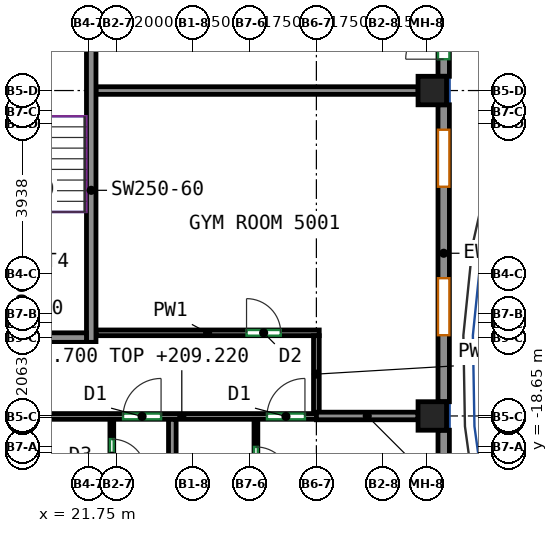
"""IFC4 building model, lengths in metres.
Left out: names, types, materials, properties, quantities, classifications, styles, units other than length and angle.
Written with IfcOpenShell. Run it as: python <this file> out.ifc"""

import sys

from ifc_helpers import new_model, si_unit, direction, frame, frame_2d, origin, origin_2d, place, context, subcontext, project, spatial, rectangle, extrude, source, transform, mapped, element, fill, save


model = new_model("IFC4")
c1 = context("Model", 3, precision=1e-05, world=origin(), true_north=direction((0.0, 1.0)))
c2 = subcontext(c1, "Body", "Model", "MODEL_VIEW")
j1 = project(units=[si_unit("LENGTHUNIT", "METRE"), si_unit("PLANEANGLEUNIT", "RADIAN")], contexts=[c1])
p1 = place(None, origin())
s1 = spatial("IfcSite", under=j1, at=p1, CompositionType="ELEMENT")
p2 = place(p1, origin())
s2 = spatial("IfcBuilding", under=s1, at=p2, CompositionType="ELEMENT")
p3 = place(p2, frame((0.0, 0.0, 206.7)))
s3 = spatial("IfcBuildingStorey", under=s2, at=p3, CompositionType="ELEMENT", Elevation=206.7)
m1 = source(origin(), c2, "Body", "SweptSolid", [
    extrude(rectangle(XDim=0.75, YDim=0.75, at=origin_2d()), origin(), (0.0, 0.0, 1.0), 3.12),
])
for number, where, z_axis, x_axis in (
    (1, (30.8, -17.688, 0.0), (0.0, 0.0, 1.0), (1.0, 0.0, 0.0)),
    (2, (30.8, -9.125, 0.0), (0.0, 0.0, 1.0), (1.0, 0.0, 0.0)),
):
    element("IfcColumn", number, at=place(p3, frame(where, z_axis=z_axis, x_axis=x_axis)), inside=s3, PredefinedType="COLUMN", context=c2, shape_type="MappedRepresentation", body=[
        mapped(m1, transform((0.0, 0.0, 0.0))),
    ])
m2 = source(origin(), c2, "Body", "SweptSolid", [
    extrude(rectangle(XDim=8.0, YDim=0.25, at=frame_2d((4.0, 0.0))), origin(), (0.0, 0.0, 1.0), 3.12),
])
p4 = place(p3, frame((21.825, -15.75, 0.0), z_axis=(0.0, 0.0, 1.0), x_axis=(0.0, 1.0, 0.0)))
e3 = element("IfcWall", 3, at=p4, inside=s3, PredefinedType="SHEAR", context=c2, shape_type="MappedRepresentation", body=[
    mapped(m2, transform((0.0, 0.0, 0.0))),
])
m3 = source(origin(), c2, "Body", "SweptSolid", [
    extrude(rectangle(XDim=3.7, YDim=0.25, at=frame_2d((1.85, 0.0))), origin(), (0.0, 0.0, 1.0), 3.12),
])
p5 = place(p3, frame((18.0, -15.625, 0.0), z_axis=(0.0, 0.0, 1.0), x_axis=(1.0, 0.0, 0.0)))
e4 = element("IfcWall", 4, at=p5, inside=s3, PredefinedType="SHEAR", context=c2, shape_type="MappedRepresentation", body=[
    mapped(m3, transform((0.0, 0.0, 0.0))),
])
m4 = source(origin(), c2, "Body", "SweptSolid", [
    extrude(rectangle(XDim=3.994, YDim=0.3, at=frame_2d((1.997, 0.0))), origin(), (0.0, 0.0, 1.0), 3.12),
])
p6 = place(p3, frame((31.1, -22.057, 0.0), z_axis=(0.0, 0.0, 1.0), x_axis=(0.0, 1.0, 0.0)))
e5 = element("IfcWall", 5, at=p6, inside=s3, PredefinedType="SOLIDWALL", context=c2, shape_type="MappedRepresentation", body=[
    mapped(m4, transform((0.0, 0.0, 0.0))),
])
p7 = place(p6, frame((1.75, 0.0, 0.85)))
e6 = element("IfcOpeningElement", 6, at=p7, cuts=e5, PredefinedType="OPENING", context=c2, shape_type="SweptSolid", body=[
    extrude(rectangle(XDim=1.5, YDim=1.95, at=frame_2d((0.75, 0.975))), frame((0.0, 0.16, 0.0), z_axis=(0.0, -1.0, 0.0), x_axis=(1.0, 0.0, 0.0)), (0.0, 0.0, 1.0), 0.32),
])
m5 = source(origin(), c2, "Body", "SweptSolid", [
    extrude(rectangle(XDim=7.812, YDim=0.3, at=frame_2d((3.906, 0.0))), origin(), (0.0, 0.0, 1.0), 3.12),
])
p8 = place(p3, frame((31.1, -17.312, 0.0), z_axis=(0.0, 0.0, 1.0), x_axis=(0.0, 1.0, 0.0)))
e7 = element("IfcWall", 7, at=p8, inside=s3, PredefinedType="SOLIDWALL", context=c2, shape_type="MappedRepresentation", body=[
    mapped(m5, transform((0.0, 0.0, 0.0))),
])
p9 = place(p8, frame((1.75, 0.0, 0.85)))
e8 = element("IfcOpeningElement", 8, at=p9, cuts=e7, PredefinedType="OPENING", context=c2, shape_type="SweptSolid", body=[
    extrude(rectangle(XDim=1.5, YDim=1.95, at=frame_2d((0.75, 0.975))), frame((0.0, 0.16, 0.0), z_axis=(0.0, -1.0, 0.0), x_axis=(1.0, 0.0, 0.0)), (0.0, 0.0, 1.0), 0.32),
])
p10 = place(p8, frame((5.656, 0.0, 0.85)))
e9 = element("IfcOpeningElement", 9, at=p10, cuts=e7, PredefinedType="OPENING", context=c2, shape_type="SweptSolid", body=[
    extrude(rectangle(XDim=1.5, YDim=1.95, at=frame_2d((0.75, 0.975))), frame((0.0, 0.16, 0.0), z_axis=(0.0, -1.0, 0.0), x_axis=(1.0, 0.0, 0.0)), (0.0, 0.0, 1.0), 0.32),
])
p11 = place(p3, frame((31.1, -8.75, 0.0), z_axis=(0.0, 0.0, 1.0), x_axis=(0.0, 1.0, 0.0)))
e10 = element("IfcWall", 10, at=p11, inside=s3, PredefinedType="SOLIDWALL", context=c2, shape_type="MappedRepresentation", body=[
    mapped(m5, transform((0.0, 0.0, 0.0))),
])
p12 = place(p11, frame((1.75, 0.0, 0.85)))
e11 = element("IfcOpeningElement", 11, at=p12, cuts=e10, PredefinedType="OPENING", context=c2, shape_type="SweptSolid", body=[
    extrude(rectangle(XDim=1.5, YDim=1.95, at=frame_2d((0.75, 0.975))), frame((0.0, 0.16, 0.0), z_axis=(0.0, -1.0, 0.0), x_axis=(1.0, 0.0, 0.0)), (0.0, 0.0, 1.0), 0.32),
])
p13 = place(p11, frame((0.45, 0.0, 0.0)))
e12 = element("IfcOpeningElement", 12, at=p13, cuts=e10, PredefinedType="OPENING", context=c2, shape_type="SweptSolid", body=[
    extrude(rectangle(XDim=1.0, YDim=2.1, at=frame_2d((0.5, 1.05))), frame((0.0, 0.16, 0.0), z_axis=(0.0, -1.0, 0.0), x_axis=(1.0, 0.0, 0.0)), (0.0, 0.0, 1.0), 0.32),
])
p14 = place(p11, frame((5.656, 0.0, 0.85)))
e13 = element("IfcOpeningElement", 13, at=p14, cuts=e10, PredefinedType="OPENING", context=c2, shape_type="SweptSolid", body=[
    extrude(rectangle(XDim=1.5, YDim=1.95, at=frame_2d((0.75, 0.975))), frame((0.0, 0.16, 0.0), z_axis=(0.0, -1.0, 0.0), x_axis=(1.0, 0.0, 0.0)), (0.0, 0.0, 1.0), 0.32),
])
p15 = place(p11, frame((4.356, 0.0, 0.0)))
e14 = element("IfcOpeningElement", 14, at=p15, cuts=e10, PredefinedType="OPENING", context=c2, shape_type="SweptSolid", body=[
    extrude(rectangle(XDim=1.0, YDim=2.1, at=frame_2d((0.5, 1.05))), frame((0.0, 0.16, 0.0), z_axis=(0.0, -1.0, 0.0), x_axis=(1.0, 0.0, 0.0)), (0.0, 0.0, 1.0), 0.32),
])
p16 = place(p3, frame((20.667, -17.7, 0.0), z_axis=(0.0, 0.0, 1.0), x_axis=(1.0, 0.0, 0.0)))
e15 = element("IfcWall", 15, at=p16, inside=s3, PredefinedType="PARTITIONING", context=c2, shape_type="SweptSolid", body=[
    extrude(rectangle(XDim=7.083, YDim=0.15, at=frame_2d((3.542, 0.0))), origin(), (0.0, 0.0, 1.0), 2.52),
])
p17 = place(p16, frame((1.996, 0.0, 0.0)))
e16 = element("IfcOpeningElement", 16, at=p17, cuts=e15, PredefinedType="OPENING", context=c2, shape_type="SweptSolid", body=[
    extrude(rectangle(XDim=1.0, YDim=2.1, at=frame_2d((0.5, 1.05))), frame((0.0, 0.085, 0.0), z_axis=(0.0, -1.0, 0.0), x_axis=(1.0, 0.0, 0.0)), (0.0, 0.0, 1.0), 0.17),
])
p18 = place(p16, frame((5.782, 0.0, 0.0)))
e17 = element("IfcOpeningElement", 17, at=p18, cuts=e15, PredefinedType="OPENING", context=c2, shape_type="SweptSolid", body=[
    extrude(rectangle(XDim=1.0, YDim=2.1, at=frame_2d((0.5, 1.05))), frame((0.0, 0.085, 0.0), z_axis=(0.0, -1.0, 0.0), x_axis=(1.0, 0.0, 0.0)), (0.0, 0.0, 1.0), 0.17),
])
p19 = place(p3, frame((21.95, -15.5, 0.0), z_axis=(0.0, 0.0, 1.0), x_axis=(1.0, 0.0, 0.0)))
e18 = element("IfcWall", 18, at=p19, inside=s3, PredefinedType="PARTITIONING", context=c2, shape_type="SweptSolid", body=[
    extrude(rectangle(XDim=5.875, YDim=0.15, at=frame_2d((2.938, 0.0))), origin(), (0.0, 0.0, 1.0), 3.12),
])
p20 = place(p19, frame((3.962, 0.0, 0.0)))
e19 = element("IfcOpeningElement", 19, at=p20, cuts=e18, PredefinedType="OPENING", context=c2, shape_type="SweptSolid", body=[
    extrude(rectangle(XDim=0.9, YDim=2.1, at=frame_2d((0.45, 1.05))), frame((0.0, 0.085, 0.0), z_axis=(0.0, -1.0, 0.0), x_axis=(1.0, 0.0, 0.0)), (0.0, 0.0, 1.0), 0.17),
])
p21 = place(p3, frame((27.75, -17.598, 0.0), z_axis=(0.0, 0.0, 1.0), x_axis=(0.0, 1.0, 0.0)))
e20 = element("IfcWall", 20, at=p21, inside=s3, PredefinedType="PARTITIONING", context=c2, shape_type="SweptSolid", body=[
    extrude(rectangle(XDim=2.023, YDim=0.15, at=frame_2d((1.011, 0.0))), origin(), (0.0, 0.0, 1.0), 2.52),
])
p22 = place(p3, frame((22.367, -17.777, 0.0), z_axis=(0.0, 0.0, 1.0), x_axis=(0.0, -1.0, 0.0)))
e21 = element("IfcWall", 21, at=p22, inside=s3, PredefinedType="PARTITIONING", context=c2, shape_type="SweptSolid", body=[
    extrude(rectangle(XDim=2.575, YDim=0.1, at=frame_2d((1.288, 0.0))), origin(), (0.0, 0.0, 1.0), 3.12),
])
p23 = place(p22, frame((0.519, 0.0, 0.0)))
e22 = element("IfcOpeningElement", 22, at=p23, cuts=e21, PredefinedType="OPENING", context=c2, shape_type="SweptSolid", body=[
    extrude(rectangle(XDim=0.9, YDim=2.1, at=frame_2d((0.45, 1.05))), frame((0.0, 0.06, 0.0), z_axis=(0.0, -1.0, 0.0), x_axis=(1.0, 0.0, 0.0)), (0.0, 0.0, 1.0), 0.12),
])
p24 = place(p3, frame((23.959, -20.348, 0.0), z_axis=(0.0, 0.0, 1.0), x_axis=(0.0, 1.0, 0.0)))
e23 = element("IfcWall", 23, at=p24, inside=s3, PredefinedType="PARTITIONING", context=c2, shape_type="SweptSolid", body=[
    extrude(rectangle(XDim=2.571, YDim=0.2, at=frame_2d((1.285, 0.0))), origin(), (0.0, 0.0, 1.0), 3.12),
])
p25 = place(p3, frame((26.159, -17.777, 0.0), z_axis=(0.0, 0.0, 1.0), x_axis=(0.0, -1.0, 0.0)))
e24 = element("IfcWall", 24, at=p25, inside=s3, PredefinedType="PARTITIONING", context=c2, shape_type="SweptSolid", body=[
    extrude(rectangle(XDim=2.561, YDim=0.1, at=frame_2d((1.28, 0.0))), origin(), (0.0, 0.0, 1.0), 3.12),
])
p26 = place(p25, frame((0.725, 0.0, 0.0)))
e25 = element("IfcOpeningElement", 25, at=p26, cuts=e24, PredefinedType="OPENING", context=c2, shape_type="SweptSolid", body=[
    extrude(rectangle(XDim=0.9, YDim=2.1, at=frame_2d((0.45, 1.05))), frame((0.0, 0.06, 0.0), z_axis=(0.0, -1.0, 0.0), x_axis=(1.0, 0.0, 0.0)), (0.0, 0.0, 1.0), 0.12),
])
p27 = place(p3, frame((27.752, -17.688, 0.0), z_axis=(0.0, 0.0, 1.0), x_axis=(1.0, 0.0, 0.0)))
e26 = element("IfcWall", 26, at=p27, inside=s3, PredefinedType="PARTITIONING", context=c2, shape_type="SweptSolid", body=[
    extrude(rectangle(XDim=2.673, YDim=0.2, at=frame_2d((1.336, 0.0))), origin(), (0.0, 0.0, 1.0), 2.52),
])
p28 = place(p3, frame((21.95, -9.125, 0.0), z_axis=(0.0, 0.0, 1.0), x_axis=(1.0, 0.0, 0.0)))
e27 = element("IfcWall", 27, at=p28, inside=s3, PredefinedType="PARTITIONING", context=c2, shape_type="SweptSolid", body=[
    extrude(rectangle(XDim=8.475, YDim=0.2, at=frame_2d((4.238, 0.0))), origin(), (0.0, 0.0, 1.0), 3.12),
])
p29 = place(p9, origin())
e28 = element("IfcWindow", 28, at=p29, inside=s3, PartitioningType="SINGLE_PANEL", PredefinedType="WINDOW", context=c2, shape_type="SweptSolid", body=[
    extrude(rectangle(XDim=1.5, YDim=1.95, at=frame_2d((0.75, 0.975))), frame((0.0, 0.03, 0.0), z_axis=(0.0, -1.0, 0.0), x_axis=(1.0, 0.0, 0.0)), (0.0, 0.0, 1.0), 0.06),
])
fill(e8, e28)
p30 = place(p10, origin())
e29 = element("IfcWindow", 29, at=p30, inside=s3, PartitioningType="SINGLE_PANEL", PredefinedType="WINDOW", context=c2, shape_type="SweptSolid", body=[
    extrude(rectangle(XDim=1.5, YDim=1.95, at=frame_2d((0.75, 0.975))), frame((0.0, 0.03, 0.0), z_axis=(0.0, -1.0, 0.0), x_axis=(1.0, 0.0, 0.0)), (0.0, 0.0, 1.0), 0.06),
])
fill(e9, e29)
p31 = place(p13, origin())
e30 = element("IfcDoor", 30, at=p31, inside=s3, OperationType="SINGLE_SWING_LEFT", PredefinedType="DOOR", context=c2, shape_type="SweptSolid", body=[
    extrude(rectangle(XDim=1.0, YDim=2.1, at=frame_2d((0.5, 1.05))), frame((0.0, 0.025, 0.0), z_axis=(0.0, -1.0, 0.0), x_axis=(1.0, 0.0, 0.0)), (0.0, 0.0, 1.0), 0.05),
])
fill(e12, e30)
p32 = place(p26, origin())
e31 = element("IfcDoor", 31, at=p32, inside=s3, OperationType="SINGLE_SWING_RIGHT", PredefinedType="DOOR", context=c2, shape_type="SweptSolid", body=[
    extrude(rectangle(XDim=0.9, YDim=2.1, at=frame_2d((0.45, 1.05))), frame((0.0, 0.025, 0.0), z_axis=(0.0, -1.0, 0.0), x_axis=(1.0, 0.0, 0.0)), (0.0, 0.0, 1.0), 0.05),
])
fill(e25, e31)
p33 = place(p23, origin())
e32 = element("IfcDoor", 32, at=p33, inside=s3, OperationType="SINGLE_SWING_RIGHT", PredefinedType="DOOR", context=c2, shape_type="SweptSolid", body=[
    extrude(rectangle(XDim=0.9, YDim=2.1, at=frame_2d((0.45, 1.05))), frame((0.0, 0.025, 0.0), z_axis=(0.0, -1.0, 0.0), x_axis=(1.0, 0.0, 0.0)), (0.0, 0.0, 1.0), 0.05),
])
fill(e22, e32)
p34 = place(p17, origin())
e33 = element("IfcDoor", 33, at=p34, inside=s3, OperationType="SINGLE_SWING_RIGHT", PredefinedType="DOOR", context=c2, shape_type="SweptSolid", body=[
    extrude(rectangle(XDim=1.0, YDim=2.1, at=frame_2d((0.5, 1.05))), frame((0.0, 0.025, 0.0), z_axis=(0.0, -1.0, 0.0), x_axis=(1.0, 0.0, 0.0)), (0.0, 0.0, 1.0), 0.05),
])
fill(e16, e33)
p35 = place(p18, origin())
e34 = element("IfcDoor", 34, at=p35, inside=s3, OperationType="SINGLE_SWING_RIGHT", PredefinedType="DOOR", context=c2, shape_type="SweptSolid", body=[
    extrude(rectangle(XDim=1.0, YDim=2.1, at=frame_2d((0.5, 1.05))), frame((0.0, 0.025, 0.0), z_axis=(0.0, -1.0, 0.0), x_axis=(1.0, 0.0, 0.0)), (0.0, 0.0, 1.0), 0.05),
])
fill(e17, e34)
p36 = place(p20, origin())
e35 = element("IfcDoor", 35, at=p36, inside=s3, OperationType="SINGLE_SWING_LEFT", PredefinedType="DOOR", context=c2, shape_type="SweptSolid", body=[
    extrude(rectangle(XDim=0.9, YDim=2.1, at=frame_2d((0.45, 1.05))), frame((0.0, 0.025, 0.0), z_axis=(0.0, -1.0, 0.0), x_axis=(1.0, 0.0, 0.0)), (0.0, 0.0, 1.0), 0.05),
])
fill(e19, e35)
save(model, sys.argv[1])
